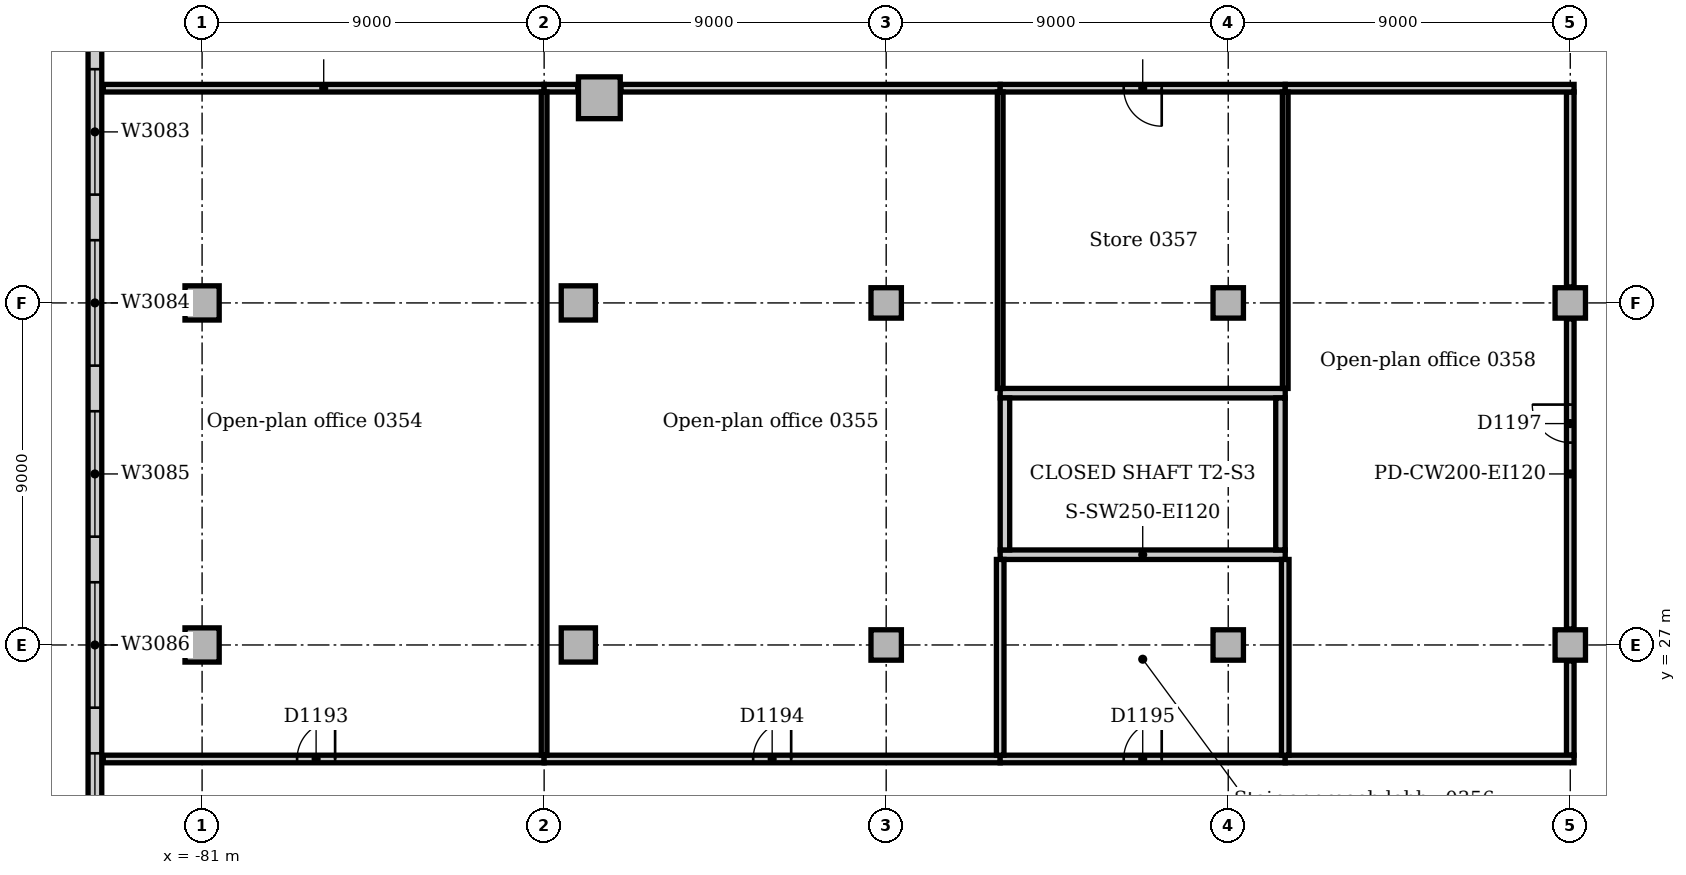
"""IFC4 building model, lengths in metres.
Left out: names, types, materials, properties, quantities, classifications, styles, units other than length and angle.
Written with IfcOpenShell. Run it as: python <this file> out.ifc"""

import sys

from ifc_helpers import new_model, si_unit, direction, frame, frame_2d, origin, origin_2d, place, context, subcontext, project, spatial, rectangle, extrude, element, fill, save


model = new_model("IFC4")
c1 = context("Model", 3, precision=1e-05, world=origin(), true_north=direction((0.0, 1.0)))
c2 = subcontext(c1, "Body", "Model", "MODEL_VIEW")
j1 = project(units=[si_unit("LENGTHUNIT", "METRE"), si_unit("PLANEANGLEUNIT", "RADIAN")], contexts=[c1])
p1 = place(None, origin())
s1 = spatial("IfcSite", under=j1, at=p1, CompositionType="ELEMENT")
p2 = place(p1, origin())
s2 = spatial("IfcBuilding", under=s1, at=p2, CompositionType="ELEMENT")
p3 = place(p2, frame((0.0, 0.0, 16.0)))
s3 = spatial("IfcBuildingStorey", under=s2, at=p3, CompositionType="ELEMENT", Elevation=16.0)
for number, where, z_axis, x_axis in (
    (1, (-60.0, 29.375, 0.0), (0.0, 0.0, 1.0), (1.0, 0.0, 0.0)),
    (2, (-52.5, 33.625, 0.0), (0.0, 0.0, 1.0), (-1.0, 0.0, 0.0)),
):
    element("IfcWall", number, at=place(p3, frame(where, z_axis=z_axis, x_axis=x_axis)), inside=s3, PredefinedType="SOLIDWALL", context=c2, shape_type="SweptSolid", body=[
        extrude(rectangle(XDim=7.5, YDim=0.25, at=frame_2d((3.75, 0.0))), origin(), (0.0, 0.0, 1.0), 5.0),
    ])
for number, where, z_axis, x_axis in (
    (3, (-52.625, 29.5, 0.0), (0.0, 0.0, 1.0), (0.0, 1.0, 0.0)),
    (4, (-59.875, 33.5, 0.0), (0.0, 0.0, 1.0), (0.0, -1.0, 0.0)),
):
    element("IfcWall", number, at=place(p3, frame(where, z_axis=z_axis, x_axis=x_axis)), inside=s3, PredefinedType="SOLIDWALL", context=c2, shape_type="SweptSolid", body=[
        extrude(rectangle(XDim=4.0, YDim=0.25, at=frame_2d((2.0, 0.0))), origin(), (0.0, 0.0, 1.0), 5.0),
    ])
p4 = place(p3, frame((-70.547, 41.398, 0.0), z_axis=(0.0, 0.0, 1.0), x_axis=(1.0, 0.0, 0.0)))
e5 = element("IfcColumn", 5, at=p4, inside=s3, PredefinedType="COLUMN", context=c2, shape_type="SweptSolid", body=[
    extrude(rectangle(XDim=1.1, YDim=1.1, at=origin_2d()), origin(), (0.0, 0.0, 1.0), 4.7),
])
for number, where, z_axis, x_axis in (
    (6, (-71.1, 27.0, 0.0), (0.0, 0.0, 1.0), (1.0, 0.0, 0.0)),
    (7, (-71.1, 36.0, 0.0), (0.0, 0.0, 1.0), (1.0, 0.0, 0.0)),
):
    element("IfcColumn", number, at=place(p3, frame(where, z_axis=z_axis, x_axis=x_axis)), inside=s3, PredefinedType="COLUMN", context=c2, shape_type="SweptSolid", body=[
        extrude(rectangle(XDim=0.9, YDim=0.9, at=origin_2d()), origin(), (0.0, 0.0, 1.0), 4.7),
    ])
for number, where, z_axis, x_axis in (
    (8, (-63.0, 27.0, 0.0), (0.0, 0.0, 1.0), (1.0, 0.0, 0.0)),
    (9, (-63.0, 36.0, 0.0), (0.0, 0.0, 1.0), (1.0, 0.0, 0.0)),
    (10, (-54.0, 27.0, 0.0), (0.0, 0.0, 1.0), (1.0, 0.0, 0.0)),
    (11, (-54.0, 36.0, 0.0), (0.0, 0.0, 1.0), (1.0, 0.0, 0.0)),
    (12, (-45.0, 27.0, 0.0), (0.0, 0.0, 1.0), (1.0, 0.0, 0.0)),
    (13, (-45.0, 36.0, 0.0), (0.0, 0.0, 1.0), (1.0, 0.0, 0.0)),
):
    element("IfcColumn", number, at=place(p3, frame(where, z_axis=z_axis, x_axis=x_axis)), inside=s3, PredefinedType="COLUMN", context=c2, shape_type="SweptSolid", body=[
        extrude(rectangle(XDim=0.8, YDim=0.8, at=origin_2d()), origin(), (0.0, 0.0, 1.0), 4.7),
    ])
for number, where, z_axis, x_axis in (
    (14, (-81.0, 27.0, 0.0), (0.0, 0.0, 1.0), (1.0, 0.0, 0.0)),
    (15, (-81.0, 36.0, 0.0), (0.0, 0.0, 1.0), (1.0, 0.0, 0.0)),
):
    element("IfcColumn", number, at=place(p3, frame(where, z_axis=z_axis, x_axis=x_axis)), inside=s3, PredefinedType="COLUMN", context=c2, shape_type="SweptSolid", body=[
        extrude(rectangle(XDim=0.9, YDim=0.9, at=origin_2d()), origin(), (0.0, 0.0, 1.0), 4.7),
    ])
p5 = place(p3, frame((-83.82, 54.0, 0.0), z_axis=(0.0, 0.0, 1.0), x_axis=(0.0, -1.0, 0.0)))
e16 = element("IfcWall", 16, at=p5, inside=s3, PredefinedType="STANDARD", context=c2, shape_type="SweptSolid", body=[
    extrude(rectangle(XDim=63.0, YDim=0.36, at=frame_2d((31.5, 0.0))), origin(), (0.0, 0.0, 1.0), 4.7),
])
p6 = place(p5, frame((2.85, 0.0, 0.9)))
e17 = element("IfcOpeningElement", 17, at=p6, cuts=e16, PredefinedType="OPENING", context=c2, shape_type="SweptSolid", body=[
    extrude(rectangle(XDim=3.3, YDim=2.4, at=frame_2d((1.65, 1.2))), frame((0.0, 0.19, 0.0), z_axis=(0.0, -1.0, 0.0), x_axis=(1.0, 0.0, 0.0)), (0.0, 0.0, 1.0), 0.38),
])
p7 = place(p5, frame((7.35, 0.0, 0.9)))
e18 = element("IfcOpeningElement", 18, at=p7, cuts=e16, PredefinedType="OPENING", context=c2, shape_type="SweptSolid", body=[
    extrude(rectangle(XDim=3.3, YDim=2.4, at=frame_2d((1.65, 1.2))), frame((0.0, 0.19, 0.0), z_axis=(0.0, -1.0, 0.0), x_axis=(1.0, 0.0, 0.0)), (0.0, 0.0, 1.0), 0.38),
])
p8 = place(p5, frame((11.85, 0.0, 0.9)))
e19 = element("IfcOpeningElement", 19, at=p8, cuts=e16, PredefinedType="OPENING", context=c2, shape_type="SweptSolid", body=[
    extrude(rectangle(XDim=3.3, YDim=2.4, at=frame_2d((1.65, 1.2))), frame((0.0, 0.19, 0.0), z_axis=(0.0, -1.0, 0.0), x_axis=(1.0, 0.0, 0.0)), (0.0, 0.0, 1.0), 0.38),
])
p9 = place(p5, frame((16.35, 0.0, 0.9)))
e20 = element("IfcOpeningElement", 20, at=p9, cuts=e16, PredefinedType="OPENING", context=c2, shape_type="SweptSolid", body=[
    extrude(rectangle(XDim=3.3, YDim=2.4, at=frame_2d((1.65, 1.2))), frame((0.0, 0.19, 0.0), z_axis=(0.0, -1.0, 0.0), x_axis=(1.0, 0.0, 0.0)), (0.0, 0.0, 1.0), 0.38),
])
p10 = place(p5, frame((20.85, 0.0, 0.9)))
e21 = element("IfcOpeningElement", 21, at=p10, cuts=e16, PredefinedType="OPENING", context=c2, shape_type="SweptSolid", body=[
    extrude(rectangle(XDim=3.3, YDim=2.4, at=frame_2d((1.65, 1.2))), frame((0.0, 0.19, 0.0), z_axis=(0.0, -1.0, 0.0), x_axis=(1.0, 0.0, 0.0)), (0.0, 0.0, 1.0), 0.38),
])
p11 = place(p5, frame((25.35, 0.0, 0.9)))
e22 = element("IfcOpeningElement", 22, at=p11, cuts=e16, PredefinedType="OPENING", context=c2, shape_type="SweptSolid", body=[
    extrude(rectangle(XDim=3.3, YDim=2.4, at=frame_2d((1.65, 1.2))), frame((0.0, 0.19, 0.0), z_axis=(0.0, -1.0, 0.0), x_axis=(1.0, 0.0, 0.0)), (0.0, 0.0, 1.0), 0.38),
])
p12 = place(p5, frame((29.85, 0.0, 0.9)))
e23 = element("IfcOpeningElement", 23, at=p12, cuts=e16, PredefinedType="OPENING", context=c2, shape_type="SweptSolid", body=[
    extrude(rectangle(XDim=3.3, YDim=2.4, at=frame_2d((1.65, 1.2))), frame((0.0, 0.19, 0.0), z_axis=(0.0, -1.0, 0.0), x_axis=(1.0, 0.0, 0.0)), (0.0, 0.0, 1.0), 0.38),
])
p13 = place(p5, frame((34.35, 0.0, 0.9)))
e24 = element("IfcOpeningElement", 24, at=p13, cuts=e16, PredefinedType="OPENING", context=c2, shape_type="SweptSolid", body=[
    extrude(rectangle(XDim=3.3, YDim=2.4, at=frame_2d((1.65, 1.2))), frame((0.0, 0.19, 0.0), z_axis=(0.0, -1.0, 0.0), x_axis=(1.0, 0.0, 0.0)), (0.0, 0.0, 1.0), 0.38),
])
p14 = place(p5, frame((38.85, 0.0, 0.9)))
e25 = element("IfcOpeningElement", 25, at=p14, cuts=e16, PredefinedType="OPENING", context=c2, shape_type="SweptSolid", body=[
    extrude(rectangle(XDim=3.3, YDim=2.4, at=frame_2d((1.65, 1.2))), frame((0.0, 0.19, 0.0), z_axis=(0.0, -1.0, 0.0), x_axis=(1.0, 0.0, 0.0)), (0.0, 0.0, 1.0), 0.38),
])
p15 = place(p5, frame((43.35, 0.0, 0.9)))
e26 = element("IfcOpeningElement", 26, at=p15, cuts=e16, PredefinedType="OPENING", context=c2, shape_type="SweptSolid", body=[
    extrude(rectangle(XDim=3.3, YDim=2.4, at=frame_2d((1.65, 1.2))), frame((0.0, 0.19, 0.0), z_axis=(0.0, -1.0, 0.0), x_axis=(1.0, 0.0, 0.0)), (0.0, 0.0, 1.0), 0.38),
])
p16 = place(p5, frame((47.85, 0.0, 0.9)))
e27 = element("IfcOpeningElement", 27, at=p16, cuts=e16, PredefinedType="OPENING", context=c2, shape_type="SweptSolid", body=[
    extrude(rectangle(XDim=3.3, YDim=2.4, at=frame_2d((1.65, 1.2))), frame((0.0, 0.19, 0.0), z_axis=(0.0, -1.0, 0.0), x_axis=(1.0, 0.0, 0.0)), (0.0, 0.0, 1.0), 0.38),
])
p17 = place(p5, frame((52.35, 0.0, 0.9)))
e28 = element("IfcOpeningElement", 28, at=p17, cuts=e16, PredefinedType="OPENING", context=c2, shape_type="SweptSolid", body=[
    extrude(rectangle(XDim=3.3, YDim=2.4, at=frame_2d((1.65, 1.2))), frame((0.0, 0.19, 0.0), z_axis=(0.0, -1.0, 0.0), x_axis=(1.0, 0.0, 0.0)), (0.0, 0.0, 1.0), 0.38),
])
p18 = place(p5, frame((56.85, 0.0, 0.9)))
e29 = element("IfcOpeningElement", 29, at=p18, cuts=e16, PredefinedType="OPENING", context=c2, shape_type="SweptSolid", body=[
    extrude(rectangle(XDim=3.3, YDim=2.4, at=frame_2d((1.65, 1.2))), frame((0.0, 0.19, 0.0), z_axis=(0.0, -1.0, 0.0), x_axis=(1.0, 0.0, 0.0)), (0.0, 0.0, 1.0), 0.38),
])
p19 = place(p3, frame((-45.0, 24.1, 0.0), z_axis=(0.0, 0.0, 1.0), x_axis=(0.0, 1.0, 0.0)))
e30 = element("IfcWall", 30, at=p19, inside=s3, PredefinedType="PARTITIONING", context=c2, shape_type="SweptSolid", body=[
    extrude(rectangle(XDim=2.48, YDim=0.2, at=frame_2d((1.24, 0.0))), origin(), (0.0, 0.0, 1.0), 4.7),
])
p20 = place(p3, frame((-45.0, 27.42, 0.0), z_axis=(0.0, 0.0, 1.0), x_axis=(0.0, 1.0, 0.0)))
e31 = element("IfcWall", 31, at=p20, inside=s3, PredefinedType="PARTITIONING", context=c2, shape_type="SweptSolid", body=[
    extrude(rectangle(XDim=8.16, YDim=0.2, at=frame_2d((4.08, 0.0))), origin(), (0.0, 0.0, 1.0), 4.7),
])
p21 = place(p20, frame((4.905, 0.0, 0.0)))
e32 = element("IfcOpeningElement", 32, at=p21, cuts=e31, PredefinedType="OPENING", context=c2, shape_type="SweptSolid", body=[
    extrude(rectangle(XDim=1.0, YDim=2.1, at=frame_2d((0.5, 1.05))), frame((0.0, 0.11, 0.0), z_axis=(0.0, -1.0, 0.0), x_axis=(1.0, 0.0, 0.0)), (0.0, 0.0, 1.0), 0.22),
])
p22 = place(p3, frame((-45.0, 36.42, 0.0), z_axis=(0.0, 0.0, 1.0), x_axis=(0.0, 1.0, 0.0)))
e33 = element("IfcWall", 33, at=p22, inside=s3, PredefinedType="PARTITIONING", context=c2, shape_type="SweptSolid", body=[
    extrude(rectangle(XDim=5.13, YDim=0.2, at=frame_2d((2.565, 0.0))), origin(), (0.0, 0.0, 1.0), 4.7),
])
p23 = place(p3, frame((-83.6, 24.0, 0.0), z_axis=(0.0, 0.0, 1.0), x_axis=(1.0, 0.0, 0.0)))
e34 = element("IfcWall", 34, at=p23, inside=s3, PredefinedType="PARTITIONING", context=c2, shape_type="SweptSolid", body=[
    extrude(rectangle(XDim=11.6, YDim=0.2, at=frame_2d((5.8, 0.0))), origin(), (0.0, 0.0, 1.0), 4.7),
])
p24 = place(p23, frame((5.1, 0.0, 0.0)))
e35 = element("IfcOpeningElement", 35, at=p24, cuts=e34, PredefinedType="OPENING", context=c2, shape_type="SweptSolid", body=[
    extrude(rectangle(XDim=1.0, YDim=2.1, at=frame_2d((0.5, 1.05))), frame((0.0, 0.11, 0.0), z_axis=(0.0, -1.0, 0.0), x_axis=(1.0, 0.0, 0.0)), (0.0, 0.0, 1.0), 0.22),
])
p25 = place(p3, frame((-72.0, 24.0, 0.0), z_axis=(0.0, 0.0, 1.0), x_axis=(1.0, 0.0, 0.0)))
e36 = element("IfcWall", 36, at=p25, inside=s3, PredefinedType="PARTITIONING", context=c2, shape_type="SweptSolid", body=[
    extrude(rectangle(XDim=12.0, YDim=0.2, at=frame_2d((6.0, 0.0))), origin(), (0.0, 0.0, 1.0), 4.7),
])
p26 = place(p25, frame((5.5, 0.0, 0.0)))
e37 = element("IfcOpeningElement", 37, at=p26, cuts=e36, PredefinedType="OPENING", context=c2, shape_type="SweptSolid", body=[
    extrude(rectangle(XDim=1.0, YDim=2.1, at=frame_2d((0.5, 1.05))), frame((0.0, 0.11, 0.0), z_axis=(0.0, -1.0, 0.0), x_axis=(1.0, 0.0, 0.0)), (0.0, 0.0, 1.0), 0.22),
])
p27 = place(p3, frame((-60.0, 24.0, 0.0), z_axis=(0.0, 0.0, 1.0), x_axis=(1.0, 0.0, 0.0)))
e38 = element("IfcWall", 38, at=p27, inside=s3, PredefinedType="PARTITIONING", context=c2, shape_type="SweptSolid", body=[
    extrude(rectangle(XDim=7.5, YDim=0.2, at=frame_2d((3.75, 0.0))), origin(), (0.0, 0.0, 1.0), 4.7),
])
p28 = place(p27, frame((3.25, 0.0, 0.0)))
e39 = element("IfcOpeningElement", 39, at=p28, cuts=e38, PredefinedType="OPENING", context=c2, shape_type="SweptSolid", body=[
    extrude(rectangle(XDim=1.0, YDim=2.1, at=frame_2d((0.5, 1.05))), frame((0.0, 0.11, 0.0), z_axis=(0.0, -1.0, 0.0), x_axis=(1.0, 0.0, 0.0)), (0.0, 0.0, 1.0), 0.22),
])
p29 = place(p3, frame((-52.5, 24.0, 0.0), z_axis=(0.0, 0.0, 1.0), x_axis=(1.0, 0.0, 0.0)))
e40 = element("IfcWall", 40, at=p29, inside=s3, PredefinedType="PARTITIONING", context=c2, shape_type="SweptSolid", body=[
    extrude(rectangle(XDim=7.6, YDim=0.2, at=frame_2d((3.8, 0.0))), origin(), (0.0, 0.0, 1.0), 4.7),
])
p30 = place(p3, frame((-83.6, 41.65, 0.0), z_axis=(0.0, 0.0, 1.0), x_axis=(1.0, 0.0, 0.0)))
e41 = element("IfcWall", 41, at=p30, inside=s3, PredefinedType="PARTITIONING", context=c2, shape_type="SweptSolid", body=[
    extrude(rectangle(XDim=11.6, YDim=0.2, at=frame_2d((5.8, 0.0))), origin(), (0.0, 0.0, 1.0), 4.7),
])
p31 = place(p3, frame((-72.0, 41.65, 0.0), z_axis=(0.0, 0.0, 1.0), x_axis=(1.0, 0.0, 0.0)))
e42 = element("IfcWall", 42, at=p31, inside=s3, PredefinedType="PARTITIONING", context=c2, shape_type="SweptSolid", body=[
    extrude(rectangle(XDim=0.883, YDim=0.2, at=frame_2d((0.442, 0.0))), origin(), (0.0, 0.0, 1.0), 4.7),
])
p32 = place(p3, frame((-69.977, 41.65, 0.0), z_axis=(0.0, 0.0, 1.0), x_axis=(1.0, 0.0, 0.0)))
e43 = element("IfcWall", 43, at=p32, inside=s3, PredefinedType="PARTITIONING", context=c2, shape_type="SweptSolid", body=[
    extrude(rectangle(XDim=9.977, YDim=0.2, at=frame_2d((4.989, 0.0))), origin(), (0.0, 0.0, 1.0), 4.7),
])
p33 = place(p3, frame((-60.0, 41.65, 0.0), z_axis=(0.0, 0.0, 1.0), x_axis=(1.0, 0.0, 0.0)))
e44 = element("IfcWall", 44, at=p33, inside=s3, PredefinedType="PARTITIONING", context=c2, shape_type="SweptSolid", body=[
    extrude(rectangle(XDim=7.5, YDim=0.2, at=frame_2d((3.75, 0.0))), origin(), (0.0, 0.0, 1.0), 4.7),
])
p34 = place(p33, frame((3.25, 0.0, 0.0)))
e45 = element("IfcOpeningElement", 45, at=p34, cuts=e44, PredefinedType="OPENING", context=c2, shape_type="SweptSolid", body=[
    extrude(rectangle(XDim=1.0, YDim=2.1, at=frame_2d((0.5, 1.05))), frame((0.0, 0.11, 0.0), z_axis=(0.0, -1.0, 0.0), x_axis=(1.0, 0.0, 0.0)), (0.0, 0.0, 1.0), 0.22),
])
p35 = place(p3, frame((-52.5, 41.65, 0.0), z_axis=(0.0, 0.0, 1.0), x_axis=(1.0, 0.0, 0.0)))
e46 = element("IfcWall", 46, at=p35, inside=s3, PredefinedType="PARTITIONING", context=c2, shape_type="SweptSolid", body=[
    extrude(rectangle(XDim=7.6, YDim=0.2, at=frame_2d((3.8, 0.0))), origin(), (0.0, 0.0, 1.0), 4.7),
])
p36 = place(p3, frame((-72.0, 24.1, 0.0), z_axis=(0.0, 0.0, 1.0), x_axis=(0.0, 1.0, 0.0)))
e47 = element("IfcWall", 47, at=p36, inside=s3, PredefinedType="PARTITIONING", context=c2, shape_type="SweptSolid", body=[
    extrude(rectangle(XDim=17.45, YDim=0.15, at=frame_2d((8.725, 0.0))), origin(), (0.0, 0.0, 1.0), 4.7),
])
p37 = place(p3, frame((-60.0, 24.1, 0.0), z_axis=(0.0, 0.0, 1.0), x_axis=(0.0, 1.0, 0.0)))
e48 = element("IfcWall", 48, at=p37, inside=s3, PredefinedType="PARTITIONING", context=c2, shape_type="SweptSolid", body=[
    extrude(rectangle(XDim=5.15, YDim=0.2, at=frame_2d((2.575, 0.0))), origin(), (0.0, 0.0, 1.0), 4.7),
])
p38 = place(p3, frame((-60.0, 33.75, 0.0), z_axis=(0.0, 0.0, 1.0), x_axis=(0.0, 1.0, 0.0)))
e49 = element("IfcWall", 49, at=p38, inside=s3, PredefinedType="PARTITIONING", context=c2, shape_type="SweptSolid", body=[
    extrude(rectangle(XDim=7.8, YDim=0.15, at=frame_2d((3.9, 0.0))), origin(), (0.0, 0.0, 1.0), 4.7),
])
p39 = place(p3, frame((-52.5, 24.1, 0.0), z_axis=(0.0, 0.0, 1.0), x_axis=(0.0, 1.0, 0.0)))
e50 = element("IfcWall", 50, at=p39, inside=s3, PredefinedType="PARTITIONING", context=c2, shape_type="SweptSolid", body=[
    extrude(rectangle(XDim=5.15, YDim=0.2, at=frame_2d((2.575, 0.0))), origin(), (0.0, 0.0, 1.0), 4.7),
])
p40 = place(p3, frame((-52.5, 33.75, 0.0), z_axis=(0.0, 0.0, 1.0), x_axis=(0.0, 1.0, 0.0)))
e51 = element("IfcWall", 51, at=p40, inside=s3, PredefinedType="PARTITIONING", context=c2, shape_type="SweptSolid", body=[
    extrude(rectangle(XDim=7.8, YDim=0.15, at=frame_2d((3.9, 0.0))), origin(), (0.0, 0.0, 1.0), 4.7),
])
p41 = place(p8, origin())
e52 = element("IfcWindow", 52, at=p41, inside=s3, PartitioningType="SINGLE_PANEL", PredefinedType="WINDOW", context=c2, shape_type="SweptSolid", body=[
    extrude(rectangle(XDim=3.3, YDim=2.4, at=frame_2d((1.65, 1.2))), frame((0.0, 0.13, 0.0), z_axis=(0.0, -1.0, 0.0), x_axis=(1.0, 0.0, 0.0)), (0.0, 0.0, 1.0), 0.06),
])
fill(e19, e52)
p42 = place(p9, origin())
e53 = element("IfcWindow", 53, at=p42, inside=s3, PartitioningType="SINGLE_PANEL", PredefinedType="WINDOW", context=c2, shape_type="SweptSolid", body=[
    extrude(rectangle(XDim=3.3, YDim=2.4, at=frame_2d((1.65, 1.2))), frame((0.0, 0.13, 0.0), z_axis=(0.0, -1.0, 0.0), x_axis=(1.0, 0.0, 0.0)), (0.0, 0.0, 1.0), 0.06),
])
fill(e20, e53)
p43 = place(p10, origin())
e54 = element("IfcWindow", 54, at=p43, inside=s3, PartitioningType="SINGLE_PANEL", PredefinedType="WINDOW", context=c2, shape_type="SweptSolid", body=[
    extrude(rectangle(XDim=3.3, YDim=2.4, at=frame_2d((1.65, 1.2))), frame((0.0, 0.13, 0.0), z_axis=(0.0, -1.0, 0.0), x_axis=(1.0, 0.0, 0.0)), (0.0, 0.0, 1.0), 0.06),
])
fill(e21, e54)
p44 = place(p11, origin())
e55 = element("IfcWindow", 55, at=p44, inside=s3, PartitioningType="SINGLE_PANEL", PredefinedType="WINDOW", context=c2, shape_type="SweptSolid", body=[
    extrude(rectangle(XDim=3.3, YDim=2.4, at=frame_2d((1.65, 1.2))), frame((0.0, 0.13, 0.0), z_axis=(0.0, -1.0, 0.0), x_axis=(1.0, 0.0, 0.0)), (0.0, 0.0, 1.0), 0.06),
])
fill(e22, e55)
p45 = place(p12, origin())
e56 = element("IfcWindow", 56, at=p45, inside=s3, PartitioningType="SINGLE_PANEL", PredefinedType="WINDOW", context=c2, shape_type="SweptSolid", body=[
    extrude(rectangle(XDim=3.3, YDim=2.4, at=frame_2d((1.65, 1.2))), frame((0.0, 0.13, 0.0), z_axis=(0.0, -1.0, 0.0), x_axis=(1.0, 0.0, 0.0)), (0.0, 0.0, 1.0), 0.06),
])
fill(e23, e56)
p46 = place(p24, origin())
e57 = element("IfcDoor", 57, at=p46, inside=s3, OperationType="SINGLE_SWING_RIGHT", PredefinedType="DOOR", context=c2, shape_type="SweptSolid", body=[
    extrude(rectangle(XDim=1.0, YDim=2.1, at=frame_2d((0.5, 1.05))), frame((0.0, 0.025, 0.0), z_axis=(0.0, -1.0, 0.0), x_axis=(1.0, 0.0, 0.0)), (0.0, 0.0, 1.0), 0.05),
])
fill(e35, e57)
p47 = place(p26, origin())
e58 = element("IfcDoor", 58, at=p47, inside=s3, OperationType="SINGLE_SWING_RIGHT", PredefinedType="DOOR", context=c2, shape_type="SweptSolid", body=[
    extrude(rectangle(XDim=1.0, YDim=2.1, at=frame_2d((0.5, 1.05))), frame((0.0, 0.025, 0.0), z_axis=(0.0, -1.0, 0.0), x_axis=(1.0, 0.0, 0.0)), (0.0, 0.0, 1.0), 0.05),
])
fill(e37, e58)
p48 = place(p28, origin())
e59 = element("IfcDoor", 59, at=p48, inside=s3, OperationType="SINGLE_SWING_RIGHT", PredefinedType="DOOR", context=c2, shape_type="SweptSolid", body=[
    extrude(rectangle(XDim=1.0, YDim=2.1, at=frame_2d((0.5, 1.05))), frame((0.0, 0.025, 0.0), z_axis=(0.0, -1.0, 0.0), x_axis=(1.0, 0.0, 0.0)), (0.0, 0.0, 1.0), 0.05),
])
fill(e39, e59)
p49 = place(p34, frame((1.0, 0.0, 0.0), z_axis=(0.0, 0.0, 1.0), x_axis=(-1.0, 0.0, 0.0)))
e60 = element("IfcDoor", 60, at=p49, inside=s3, OperationType="SINGLE_SWING_LEFT", PredefinedType="DOOR", context=c2, shape_type="SweptSolid", body=[
    extrude(rectangle(XDim=1.0, YDim=2.1, at=frame_2d((0.5, 1.05))), frame((0.0, 0.025, 0.0), z_axis=(0.0, -1.0, 0.0), x_axis=(1.0, 0.0, 0.0)), (0.0, 0.0, 1.0), 0.05),
])
fill(e45, e60)
p50 = place(p21, origin())
e61 = element("IfcDoor", 61, at=p50, inside=s3, OperationType="SINGLE_SWING_RIGHT", PredefinedType="DOOR", context=c2, shape_type="SweptSolid", body=[
    extrude(rectangle(XDim=1.0, YDim=2.1, at=frame_2d((0.5, 1.05))), frame((0.0, 0.025, 0.0), z_axis=(0.0, -1.0, 0.0), x_axis=(1.0, 0.0, 0.0)), (0.0, 0.0, 1.0), 0.05),
])
fill(e32, e61)
save(model, sys.argv[1])
